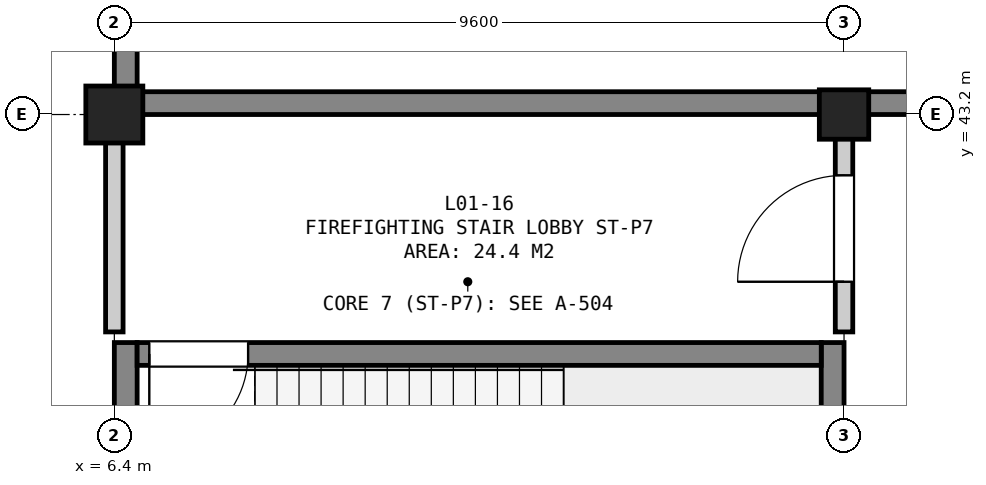
"""IFC4 building model, lengths in metres.
Left out: names, types, materials, properties, quantities, classifications, styles, units other than length and angle.
Written with IfcOpenShell. Run it as: python <this file> out.ifc"""

import sys

from ifc_helpers import new_model, si_unit, direction, frame, frame_2d, origin, origin_2d, place, context, subcontext, project, spatial, rectangle, extrude, element, fill, save


model = new_model("IFC4")
c1 = context("Model", 3, precision=1e-05, world=origin(), true_north=direction((0.0, 1.0)))
c2 = subcontext(c1, "Body", "Model", "MODEL_VIEW")
j1 = project(units=[si_unit("LENGTHUNIT", "METRE"), si_unit("PLANEANGLEUNIT", "RADIAN")], contexts=[c1])
p1 = place(None, origin())
s1 = spatial("IfcSite", under=j1, at=p1, CompositionType="ELEMENT")
p2 = place(p1, origin())
s2 = spatial("IfcBuilding", under=s1, at=p2, CompositionType="ELEMENT")
p3 = place(p2, frame((0.0, 0.0, 5.4)))
s3 = spatial("IfcBuildingStorey", under=s2, at=p3, CompositionType="ELEMENT", Elevation=5.4)
p4 = place(p3, frame((6.4, 43.2, 0.0), z_axis=(0.0, 0.0, 1.0), x_axis=(1.0, 0.0, 0.0)))
e1 = element("IfcColumn", 1, at=p4, inside=s3, PredefinedType="COLUMN", context=c2, shape_type="SweptSolid", body=[
    extrude(rectangle(XDim=0.75, YDim=0.75, at=origin_2d()), origin(), (0.0, 0.0, 1.0), 5.4),
])
p5 = place(p3, frame((16.0, 43.2, 0.0), z_axis=(0.0, 0.0, 1.0), x_axis=(1.0, 0.0, 0.0)))
e2 = element("IfcColumn", 2, at=p5, inside=s3, PredefinedType="COLUMN", context=c2, shape_type="SweptSolid", body=[
    extrude(rectangle(XDim=0.65, YDim=0.65, at=origin_2d()), origin(), (0.0, 0.0, 1.0), 5.4),
])
p6 = place(p3, frame((6.7, 43.35, 0.0), z_axis=(0.0, 0.0, 1.0), x_axis=(1.0, 0.0, 0.0)))
e3 = element("IfcWall", 3, at=p6, inside=s3, PredefinedType="SHEAR", context=c2, shape_type="SweptSolid", body=[
    extrude(rectangle(XDim=28.2, YDim=0.3, at=frame_2d((14.1, 0.0))), origin(), (0.0, 0.0, 1.0), 5.1),
])
p7 = place(p3, frame((6.55, 43.2, 0.0), z_axis=(0.0, 0.0, 1.0), x_axis=(0.0, 1.0, 0.0)))
e4 = element("IfcWall", 4, at=p7, inside=s3, PredefinedType="SHEAR", context=c2, shape_type="SweptSolid", body=[
    extrude(rectangle(XDim=22.4, YDim=0.3, at=frame_2d((11.2, 0.0))), origin(), (0.0, 0.0, 1.0), 5.1),
])
for number, where, z_axis, x_axis in (
    (5, (6.55, 36.0, 0.0), (0.0, 0.0, 1.0), (0.0, 1.0, 0.0)),
    (6, (15.85, 36.0, 0.0), (0.0, 0.0, 1.0), (0.0, 1.0, 0.0)),
):
    element("IfcWall", number, at=place(p3, frame(where, z_axis=z_axis, x_axis=x_axis)), inside=s3, PredefinedType="SHEAR", context=c2, shape_type="SweptSolid", body=[
        extrude(rectangle(XDim=4.2, YDim=0.3, at=frame_2d((2.1, 0.0))), origin(), (0.0, 0.0, 1.0), 5.1),
    ])
p8 = place(p3, frame((6.7, 40.05, 0.0), z_axis=(0.0, 0.0, 1.0), x_axis=(1.0, 0.0, 0.0)))
e7 = element("IfcWall", 7, at=p8, inside=s3, PredefinedType="SHEAR", context=c2, shape_type="SweptSolid", body=[
    extrude(rectangle(XDim=9.0, YDim=0.3, at=frame_2d((4.5, 0.0))), origin(), (0.0, 0.0, 1.0), 5.1),
])
p9 = place(p8, frame((0.16, 0.0, 0.0)))
e8 = element("IfcOpeningElement", 8, at=p9, cuts=e7, PredefinedType="OPENING", context=c2, shape_type="SweptSolid", body=[
    extrude(rectangle(XDim=1.3, YDim=2.18, at=frame_2d((0.65, 1.09))), frame((0.0, 0.162, 0.0), z_axis=(0.0, -1.0, 0.0), x_axis=(1.0, 0.0, 0.0)), (0.0, 0.0, 1.0), 0.324),
])
p10 = place(p3, frame((6.4, 40.34, 0.0), z_axis=(0.0, 0.0, 1.0), x_axis=(0.0, 1.0, 0.0)))
e9 = element("IfcWall", 9, at=p10, inside=s3, PredefinedType="SOLIDWALL", context=c2, shape_type="SweptSolid", body=[
    extrude(rectangle(XDim=2.72, YDim=0.23, at=frame_2d((1.36, 0.0))), origin(), (0.0, 0.0, 1.0), 4.485),
])
p11 = place(p3, frame((16.0, 40.34, 0.0), z_axis=(0.0, 0.0, 1.0), x_axis=(0.0, 1.0, 0.0)))
e10 = element("IfcWall", 10, at=p11, inside=s3, PredefinedType="SOLIDWALL", context=c2, shape_type="SweptSolid", body=[
    extrude(rectangle(XDim=2.72, YDim=0.23, at=frame_2d((1.36, 0.0))), origin(), (0.0, 0.0, 1.0), 4.435),
])
p12 = place(p11, frame((0.66, 0.0, 0.0)))
e11 = element("IfcOpeningElement", 11, at=p12, cuts=e10, PredefinedType="OPENING", context=c2, shape_type="SweptSolid", body=[
    extrude(rectangle(XDim=1.4, YDim=2.2, at=frame_2d((0.7, 1.1))), frame((0.0, 0.127, 0.0), z_axis=(0.0, -1.0, 0.0), x_axis=(1.0, 0.0, 0.0)), (0.0, 0.0, 1.0), 0.254),
])
p13 = place(p9, frame((1.3, 0.0, 0.0), z_axis=(0.0, 0.0, 1.0), x_axis=(-1.0, 0.0, 0.0)))
e12 = element("IfcDoor", 12, at=p13, inside=s3, OperationType="SINGLE_SWING_RIGHT", PredefinedType="DOOR", context=c2, shape_type="SweptSolid", body=[
    extrude(rectangle(XDim=1.3, YDim=2.18, at=frame_2d((0.65, 1.09))), frame((0.0, 0.025, 0.0), z_axis=(0.0, -1.0, 0.0), x_axis=(1.0, 0.0, 0.0)), (0.0, 0.0, 1.0), 0.05),
])
fill(e8, e12)
p14 = place(p12, origin())
e13 = element("IfcDoor", 13, at=p14, inside=s3, OperationType="SINGLE_SWING_LEFT", PredefinedType="DOOR", context=c2, shape_type="SweptSolid", body=[
    extrude(rectangle(XDim=1.4, YDim=2.2, at=frame_2d((0.7, 1.1))), frame((0.0, 0.025, 0.0), z_axis=(0.0, -1.0, 0.0), x_axis=(1.0, 0.0, 0.0)), (0.0, 0.0, 1.0), 0.05),
])
fill(e11, e13)
save(model, sys.argv[1])
